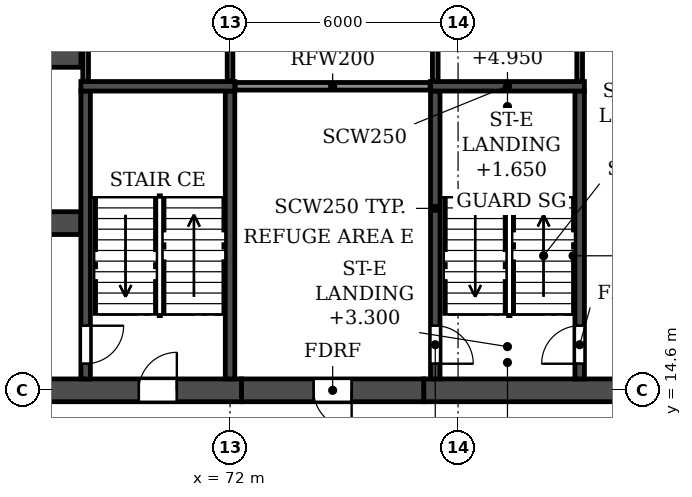
"""IFC4 building model, lengths in metres.
Left out: names, types, materials, properties, quantities, classifications, styles, units other than length and angle.
Written with IfcOpenShell. Run it as: python <this file> out.ifc"""

import sys

from ifc_helpers import new_model, si_unit, direction, frame, frame_2d, origin, place, context, subcontext, project, spatial, rectangle, extrude, element, fill, save


model = new_model("IFC4")
c1 = context("Model", 3, precision=1e-05, world=origin(), true_north=direction((0.0, 1.0)))
c2 = subcontext(c1, "Body", "Model", "MODEL_VIEW")
j1 = project(units=[si_unit("LENGTHUNIT", "METRE"), si_unit("PLANEANGLEUNIT", "RADIAN")], contexts=[c1])
p1 = place(None, origin())
s1 = spatial("IfcSite", under=j1, at=p1, CompositionType="ELEMENT")
p2 = place(p1, origin())
s2 = spatial("IfcBuilding", under=s1, at=p2, CompositionType="ELEMENT")
p3 = place(p2, frame((0.0, 0.0, 66.3)))
s3 = spatial("IfcBuildingStorey", under=s2, at=p3, CompositionType="ELEMENT", Elevation=66.3)
p4 = place(p3, frame((72.3, 14.6, 0.0), z_axis=(0.0, 0.0, 1.0), x_axis=(1.0, 0.0, 0.0)))
e1 = element("IfcWall", 1, at=p4, inside=s3, PredefinedType="SHEAR", context=c2, shape_type="SweptSolid", body=[
    extrude(rectangle(XDim=4.8, YDim=0.6, at=frame_2d((2.4, 0.0))), origin(), (0.0, 0.0, 1.0), 6.36),
])
p5 = place(p4, frame((1.9, 0.0, 0.0)))
e2 = element("IfcOpeningElement", 2, at=p5, cuts=e1, PredefinedType="OPENING", context=c2, shape_type="SweptSolid", body=[
    extrude(rectangle(XDim=1.0, YDim=2.1, at=frame_2d((0.5, 1.05))), frame((0.0, 0.31, 0.0), z_axis=(0.0, -1.0, 0.0), x_axis=(1.0, 0.0, 0.0)), (0.0, 0.0, 1.0), 0.62),
])
p6 = place(p3, frame((29.7, 14.6, 0.0), z_axis=(0.0, 0.0, 1.0), x_axis=(1.0, 0.0, 0.0)))
e3 = element("IfcWall", 3, at=p6, inside=s3, PredefinedType="SOLIDWALL", context=c2, shape_type="SweptSolid", body=[
    extrude(rectangle(XDim=42.6, YDim=0.6, at=frame_2d((21.3, 0.0))), origin(), (0.0, 0.0, 1.0), 6.36),
])
p7 = place(p6, frame((1.7, 0.0, 0.0)))
e4 = element("IfcOpeningElement", 4, at=p7, cuts=e3, PredefinedType="OPENING", context=c2, shape_type="SweptSolid", body=[
    extrude(rectangle(XDim=1.0, YDim=2.1, at=frame_2d((0.5, 1.05))), frame((0.0, 0.31, 0.0), z_axis=(0.0, -1.0, 0.0), x_axis=(1.0, 0.0, 0.0)), (0.0, 0.0, 1.0), 0.62),
])
p8 = place(p6, frame((13.0, 0.0, 0.0)))
e5 = element("IfcOpeningElement", 5, at=p8, cuts=e3, PredefinedType="OPENING", context=c2, shape_type="SweptSolid", body=[
    extrude(rectangle(XDim=1.0, YDim=2.1, at=frame_2d((0.5, 1.05))), frame((0.0, 0.31, 0.0), z_axis=(0.0, -1.0, 0.0), x_axis=(1.0, 0.0, 0.0)), (0.0, 0.0, 1.0), 0.62),
])
p9 = place(p6, frame((16.9, 0.0, 0.0)))
e6 = element("IfcOpeningElement", 6, at=p9, cuts=e3, PredefinedType="OPENING", context=c2, shape_type="SweptSolid", body=[
    extrude(rectangle(XDim=1.0, YDim=2.1, at=frame_2d((0.5, 1.05))), frame((0.0, 0.31, 0.0), z_axis=(0.0, -1.0, 0.0), x_axis=(1.0, 0.0, 0.0)), (0.0, 0.0, 1.0), 0.62),
])
p10 = place(p6, frame((20.8, 0.0, 0.0)))
e7 = element("IfcOpeningElement", 7, at=p10, cuts=e3, PredefinedType="OPENING", context=c2, shape_type="SweptSolid", body=[
    extrude(rectangle(XDim=1.0, YDim=2.1, at=frame_2d((0.5, 1.05))), frame((0.0, 0.31, 0.0), z_axis=(0.0, -1.0, 0.0), x_axis=(1.0, 0.0, 0.0)), (0.0, 0.0, 1.0), 0.62),
])
p11 = place(p6, frame((23.4, 0.0, 0.0)))
e8 = element("IfcOpeningElement", 8, at=p11, cuts=e3, PredefinedType="OPENING", context=c2, shape_type="SweptSolid", body=[
    extrude(rectangle(XDim=1.0, YDim=2.1, at=frame_2d((0.5, 1.05))), frame((0.0, 0.31, 0.0), z_axis=(0.0, -1.0, 0.0), x_axis=(1.0, 0.0, 0.0)), (0.0, 0.0, 1.0), 0.62),
])
p12 = place(p6, frame((27.3, 0.0, 0.0)))
e9 = element("IfcOpeningElement", 9, at=p12, cuts=e3, PredefinedType="OPENING", context=c2, shape_type="SweptSolid", body=[
    extrude(rectangle(XDim=1.0, YDim=2.1, at=frame_2d((0.5, 1.05))), frame((0.0, 0.31, 0.0), z_axis=(0.0, -1.0, 0.0), x_axis=(1.0, 0.0, 0.0)), (0.0, 0.0, 1.0), 0.62),
])
p13 = place(p6, frame((39.9, 0.0, 0.0)))
e10 = element("IfcOpeningElement", 10, at=p13, cuts=e3, PredefinedType="OPENING", context=c2, shape_type="SweptSolid", body=[
    extrude(rectangle(XDim=1.0, YDim=2.1, at=frame_2d((0.5, 1.05))), frame((0.0, 0.31, 0.0), z_axis=(0.0, -1.0, 0.0), x_axis=(1.0, 0.0, 0.0)), (0.0, 0.0, 1.0), 0.62),
])
p14 = place(p3, frame((77.1, 14.6, 0.0), z_axis=(0.0, 0.0, 1.0), x_axis=(1.0, 0.0, 0.0)))
e11 = element("IfcWall", 11, at=p14, inside=s3, PredefinedType="SOLIDWALL", context=c2, shape_type="SweptSolid", body=[
    extrude(rectangle(XDim=7.2, YDim=0.6, at=frame_2d((3.6, 0.0))), origin(), (0.0, 0.0, 1.0), 6.36),
])
p15 = place(p14, frame((5.0, 0.0, 0.0)))
e12 = element("IfcOpeningElement", 12, at=p15, cuts=e11, PredefinedType="OPENING", context=c2, shape_type="SweptSolid", body=[
    extrude(rectangle(XDim=1.0, YDim=2.1, at=frame_2d((0.5, 1.05))), frame((0.0, 0.31, 0.0), z_axis=(0.0, -1.0, 0.0), x_axis=(1.0, 0.0, 0.0)), (0.0, 0.0, 1.0), 0.62),
])
p16 = place(p3, frame((33.925, 19.0, 0.0), z_axis=(0.0, 0.0, 1.0), x_axis=(1.0, 0.0, 0.0)))
e13 = element("IfcWall", 13, at=p16, inside=s3, PredefinedType="SOLIDWALL", context=c2, shape_type="SweptSolid", body=[
    extrude(rectangle(XDim=34.15, YDim=0.6, at=frame_2d((17.075, 0.0))), origin(), (0.0, 0.0, 1.0), 6.36),
])
p17 = place(p16, frame((16.175, 0.0, 0.0)))
e14 = element("IfcOpeningElement", 14, at=p17, cuts=e13, PredefinedType="OPENING", context=c2, shape_type="SweptSolid", body=[
    extrude(rectangle(XDim=1.8, YDim=2.1, at=frame_2d((0.9, 1.05))), frame((0.0, 0.31, 0.0), z_axis=(0.0, -1.0, 0.0), x_axis=(1.0, 0.0, 0.0)), (0.0, 0.0, 1.0), 0.62),
])
p18 = place(p16, frame((1.525, 0.0, 0.0)))
e15 = element("IfcOpeningElement", 15, at=p18, cuts=e13, PredefinedType="OPENING", context=c2, shape_type="SweptSolid", body=[
    extrude(rectangle(XDim=1.8, YDim=2.1, at=frame_2d((0.9, 1.05))), frame((0.0, 0.31, 0.0), z_axis=(0.0, -1.0, 0.0), x_axis=(1.0, 0.0, 0.0)), (0.0, 0.0, 1.0), 0.62),
])
p19 = place(p16, frame((8.725, 0.0, 0.0)))
e16 = element("IfcOpeningElement", 16, at=p19, cuts=e13, PredefinedType="OPENING", context=c2, shape_type="SweptSolid", body=[
    extrude(rectangle(XDim=1.1, YDim=2.1, at=frame_2d((0.55, 1.05))), frame((0.0, 0.31, 0.0), z_axis=(0.0, -1.0, 0.0), x_axis=(1.0, 0.0, 0.0)), (0.0, 0.0, 1.0), 0.62),
])
p20 = place(p16, frame((11.325, 0.0, 0.0)))
e17 = element("IfcOpeningElement", 17, at=p20, cuts=e13, PredefinedType="OPENING", context=c2, shape_type="SweptSolid", body=[
    extrude(rectangle(XDim=1.1, YDim=2.1, at=frame_2d((0.55, 1.05))), frame((0.0, 0.31, 0.0), z_axis=(0.0, -1.0, 0.0), x_axis=(1.0, 0.0, 0.0)), (0.0, 0.0, 1.0), 0.62),
])
p21 = place(p16, frame((13.925, 0.0, 0.0)))
e18 = element("IfcOpeningElement", 18, at=p21, cuts=e13, PredefinedType="OPENING", context=c2, shape_type="SweptSolid", body=[
    extrude(rectangle(XDim=1.1, YDim=2.1, at=frame_2d((0.55, 1.05))), frame((0.0, 0.31, 0.0), z_axis=(0.0, -1.0, 0.0), x_axis=(1.0, 0.0, 0.0)), (0.0, 0.0, 1.0), 0.62),
])
p22 = place(p16, frame((19.125, 0.0, 0.0)))
e19 = element("IfcOpeningElement", 19, at=p22, cuts=e13, PredefinedType="OPENING", context=c2, shape_type="SweptSolid", body=[
    extrude(rectangle(XDim=1.1, YDim=2.1, at=frame_2d((0.55, 1.05))), frame((0.0, 0.31, 0.0), z_axis=(0.0, -1.0, 0.0), x_axis=(1.0, 0.0, 0.0)), (0.0, 0.0, 1.0), 0.62),
])
p23 = place(p16, frame((21.725, 0.0, 0.0)))
e20 = element("IfcOpeningElement", 20, at=p23, cuts=e13, PredefinedType="OPENING", context=c2, shape_type="SweptSolid", body=[
    extrude(rectangle(XDim=1.1, YDim=2.1, at=frame_2d((0.55, 1.05))), frame((0.0, 0.31, 0.0), z_axis=(0.0, -1.0, 0.0), x_axis=(1.0, 0.0, 0.0)), (0.0, 0.0, 1.0), 0.62),
])
p24 = place(p16, frame((24.325, 0.0, 0.0)))
e21 = element("IfcOpeningElement", 21, at=p24, cuts=e13, PredefinedType="OPENING", context=c2, shape_type="SweptSolid", body=[
    extrude(rectangle(XDim=1.1, YDim=2.1, at=frame_2d((0.55, 1.05))), frame((0.0, 0.31, 0.0), z_axis=(0.0, -1.0, 0.0), x_axis=(1.0, 0.0, 0.0)), (0.0, 0.0, 1.0), 0.62),
])
p25 = place(p16, frame((30.825, 0.0, 0.0)))
e22 = element("IfcOpeningElement", 22, at=p25, cuts=e13, PredefinedType="OPENING", context=c2, shape_type="SweptSolid", body=[
    extrude(rectangle(XDim=1.8, YDim=2.1, at=frame_2d((0.9, 1.05))), frame((0.0, 0.31, 0.0), z_axis=(0.0, -1.0, 0.0), x_axis=(1.0, 0.0, 0.0)), (0.0, 0.0, 1.0), 0.62),
])
p26 = place(p3, frame((33.925, 23.4, 0.0), z_axis=(0.0, 0.0, 1.0), x_axis=(1.0, 0.0, 0.0)))
e23 = element("IfcWall", 23, at=p26, inside=s3, PredefinedType="SOLIDWALL", context=c2, shape_type="SweptSolid", body=[
    extrude(rectangle(XDim=34.15, YDim=0.6, at=frame_2d((17.075, 0.0))), origin(), (0.0, 0.0, 1.0), 6.36),
])
p27 = place(p26, frame((16.175, 0.0, 0.0)))
e24 = element("IfcOpeningElement", 24, at=p27, cuts=e23, PredefinedType="OPENING", context=c2, shape_type="SweptSolid", body=[
    extrude(rectangle(XDim=1.8, YDim=2.1, at=frame_2d((0.9, 1.05))), frame((0.0, 0.31, 0.0), z_axis=(0.0, -1.0, 0.0), x_axis=(1.0, 0.0, 0.0)), (0.0, 0.0, 1.0), 0.62),
])
p28 = place(p26, frame((11.025, 0.0, 0.0)))
e25 = element("IfcOpeningElement", 25, at=p28, cuts=e23, PredefinedType="OPENING", context=c2, shape_type="SweptSolid", body=[
    extrude(rectangle(XDim=1.1, YDim=2.1, at=frame_2d((0.55, 1.05))), frame((0.0, 0.31, 0.0), z_axis=(0.0, -1.0, 0.0), x_axis=(1.0, 0.0, 0.0)), (0.0, 0.0, 1.0), 0.62),
])
p29 = place(p3, frame((68.2, 14.9, 0.0), z_axis=(0.0, 0.0, 1.0), x_axis=(0.0, 1.0, 0.0)))
e26 = element("IfcWall", 26, at=p29, inside=s3, PredefinedType="SOLIDWALL", context=c2, shape_type="SweptSolid", body=[
    extrude(rectangle(XDim=7.575, YDim=0.25, at=frame_2d((3.788, 0.0))), origin(), (0.0, 0.0, 1.0), 6.36),
])
p30 = place(p29, frame((0.4, 0.0, 0.0)))
e27 = element("IfcOpeningElement", 27, at=p30, cuts=e26, PredefinedType="OPENING", context=c2, shape_type="SweptSolid", body=[
    extrude(rectangle(XDim=1.0, YDim=2.1, at=frame_2d((0.5, 1.05))), frame((0.0, 0.135, 0.0), z_axis=(0.0, -1.0, 0.0), x_axis=(1.0, 0.0, 0.0)), (0.0, 0.0, 1.0), 0.27),
])
p31 = place(p3, frame((72.0, 14.9, 0.0), z_axis=(0.0, 0.0, 1.0), x_axis=(0.0, 1.0, 0.0)))
e28 = element("IfcWall", 28, at=p31, inside=s3, PredefinedType="SOLIDWALL", context=c2, shape_type="SweptSolid", body=[
    extrude(rectangle(XDim=7.575, YDim=0.25, at=frame_2d((3.788, 0.0))), origin(), (0.0, 0.0, 1.0), 6.36),
])
p32 = place(p3, frame((68.075, 22.6, 0.0), z_axis=(0.0, 0.0, 1.0), x_axis=(1.0, 0.0, 0.0)))
e29 = element("IfcWall", 29, at=p32, inside=s3, PredefinedType="SOLIDWALL", context=c2, shape_type="SweptSolid", body=[
    extrude(rectangle(XDim=4.05, YDim=0.25, at=frame_2d((2.025, 0.0))), origin(), (0.0, 0.0, 1.0), 6.36),
])
p33 = place(p3, frame((77.4, 14.9, 0.0), z_axis=(0.0, 0.0, 1.0), x_axis=(0.0, 1.0, 0.0)))
e30 = element("IfcWall", 30, at=p33, inside=s3, PredefinedType="SOLIDWALL", context=c2, shape_type="SweptSolid", body=[
    extrude(rectangle(XDim=7.575, YDim=0.25, at=frame_2d((3.788, 0.0))), origin(), (0.0, 0.0, 1.0), 6.36),
])
p34 = place(p33, frame((0.4, 0.0, 0.0)))
e31 = element("IfcOpeningElement", 31, at=p34, cuts=e30, PredefinedType="OPENING", context=c2, shape_type="SweptSolid", body=[
    extrude(rectangle(XDim=1.0, YDim=2.1, at=frame_2d((0.5, 1.05))), frame((0.0, 0.135, 0.0), z_axis=(0.0, -1.0, 0.0), x_axis=(1.0, 0.0, 0.0)), (0.0, 0.0, 1.0), 0.27),
])
p35 = place(p3, frame((81.2, 14.9, 0.0), z_axis=(0.0, 0.0, 1.0), x_axis=(0.0, 1.0, 0.0)))
e32 = element("IfcWall", 32, at=p35, inside=s3, PredefinedType="SOLIDWALL", context=c2, shape_type="SweptSolid", body=[
    extrude(rectangle(XDim=7.575, YDim=0.25, at=frame_2d((3.788, 0.0))), origin(), (0.0, 0.0, 1.0), 6.36),
])
p36 = place(p35, frame((0.4, 0.0, 0.0)))
e33 = element("IfcOpeningElement", 33, at=p36, cuts=e32, PredefinedType="OPENING", context=c2, shape_type="SweptSolid", body=[
    extrude(rectangle(XDim=1.0, YDim=2.1, at=frame_2d((0.5, 1.05))), frame((0.0, 0.135, 0.0), z_axis=(0.0, -1.0, 0.0), x_axis=(1.0, 0.0, 0.0)), (0.0, 0.0, 1.0), 0.27),
])
p37 = place(p3, frame((77.275, 22.6, 0.0), z_axis=(0.0, 0.0, 1.0), x_axis=(1.0, 0.0, 0.0)))
e34 = element("IfcWall", 34, at=p37, inside=s3, PredefinedType="SOLIDWALL", context=c2, shape_type="SweptSolid", body=[
    extrude(rectangle(XDim=4.05, YDim=0.25, at=frame_2d((2.025, 0.0))), origin(), (0.0, 0.0, 1.0), 6.36),
])
p38 = place(p3, frame((72.135, 22.6, 0.0), z_axis=(0.0, 0.0, 1.0), x_axis=(1.0, 0.0, 0.0)))
e35 = element("IfcWall", 35, at=p38, inside=s3, PredefinedType="PARTITIONING", context=c2, shape_type="SweptSolid", body=[
    extrude(rectangle(XDim=5.13, YDim=0.2, at=frame_2d((2.565, 0.0))), origin(), (0.0, 0.0, 1.0), 6.36),
])
for number, where, z_axis, x_axis in (
    (36, (68.2, 22.735, 0.0), (0.0, 0.0, 1.0), (0.0, 1.0, 0.0)),
    (37, (72.0, 22.735, 0.0), (0.0, 0.0, 1.0), (0.0, 1.0, 0.0)),
    (38, (77.4, 22.735, 0.0), (0.0, 0.0, 1.0), (0.0, 1.0, 0.0)),
    (39, (81.2, 22.735, 0.0), (0.0, 0.0, 1.0), (0.0, 1.0, 0.0)),
):
    element("IfcWall", number, at=place(p3, frame(where, z_axis=z_axis, x_axis=x_axis)), inside=s3, PredefinedType="PARTITIONING", context=c2, shape_type="SweptSolid", body=[
        extrude(rectangle(XDim=4.755, YDim=0.15, at=frame_2d((2.377, 0.0))), origin(), (0.0, 0.0, 1.0), 6.36),
    ])
p39 = place(p13, origin())
e40 = element("IfcDoor", 40, at=p39, inside=s3, OperationType="SINGLE_SWING_RIGHT", PredefinedType="DOOR", context=c2, shape_type="SweptSolid", body=[
    extrude(rectangle(XDim=1.0, YDim=2.1, at=frame_2d((0.5, 1.05))), frame((0.0, 0.025, 0.0), z_axis=(0.0, -1.0, 0.0), x_axis=(1.0, 0.0, 0.0)), (0.0, 0.0, 1.0), 0.05),
])
fill(e10, e40)
p40 = place(p5, frame((1.0, 0.0, 0.0), z_axis=(0.0, 0.0, 1.0), x_axis=(-1.0, 0.0, 0.0)))
e41 = element("IfcDoor", 41, at=p40, inside=s3, OperationType="SINGLE_SWING_LEFT", PredefinedType="DOOR", context=c2, shape_type="SweptSolid", body=[
    extrude(rectangle(XDim=1.0, YDim=2.1, at=frame_2d((0.5, 1.05))), frame((0.0, 0.025, 0.0), z_axis=(0.0, -1.0, 0.0), x_axis=(1.0, 0.0, 0.0)), (0.0, 0.0, 1.0), 0.05),
])
fill(e2, e41)
p41 = place(p30, frame((1.0, 0.0, 0.0), z_axis=(0.0, 0.0, 1.0), x_axis=(-1.0, 0.0, 0.0)))
e42 = element("IfcDoor", 42, at=p41, inside=s3, OperationType="SINGLE_SWING_LEFT", PredefinedType="DOOR", context=c2, shape_type="SweptSolid", body=[
    extrude(rectangle(XDim=1.0, YDim=2.1, at=frame_2d((0.5, 1.05))), frame((0.0, 0.025, 0.0), z_axis=(0.0, -1.0, 0.0), x_axis=(1.0, 0.0, 0.0)), (0.0, 0.0, 1.0), 0.05),
])
fill(e27, e42)
p42 = place(p34, frame((1.0, 0.0, 0.0), z_axis=(0.0, 0.0, 1.0), x_axis=(-1.0, 0.0, 0.0)))
e43 = element("IfcDoor", 43, at=p42, inside=s3, OperationType="SINGLE_SWING_RIGHT", PredefinedType="DOOR", context=c2, shape_type="SweptSolid", body=[
    extrude(rectangle(XDim=1.0, YDim=2.1, at=frame_2d((0.5, 1.05))), frame((0.0, 0.025, 0.0), z_axis=(0.0, -1.0, 0.0), x_axis=(1.0, 0.0, 0.0)), (0.0, 0.0, 1.0), 0.05),
])
fill(e31, e43)
p43 = place(p36, origin())
e44 = element("IfcDoor", 44, at=p43, inside=s3, OperationType="SINGLE_SWING_LEFT", PredefinedType="DOOR", context=c2, shape_type="SweptSolid", body=[
    extrude(rectangle(XDim=1.0, YDim=2.1, at=frame_2d((0.5, 1.05))), frame((0.0, 0.025, 0.0), z_axis=(0.0, -1.0, 0.0), x_axis=(1.0, 0.0, 0.0)), (0.0, 0.0, 1.0), 0.05),
])
fill(e33, e44)
save(model, sys.argv[1])
